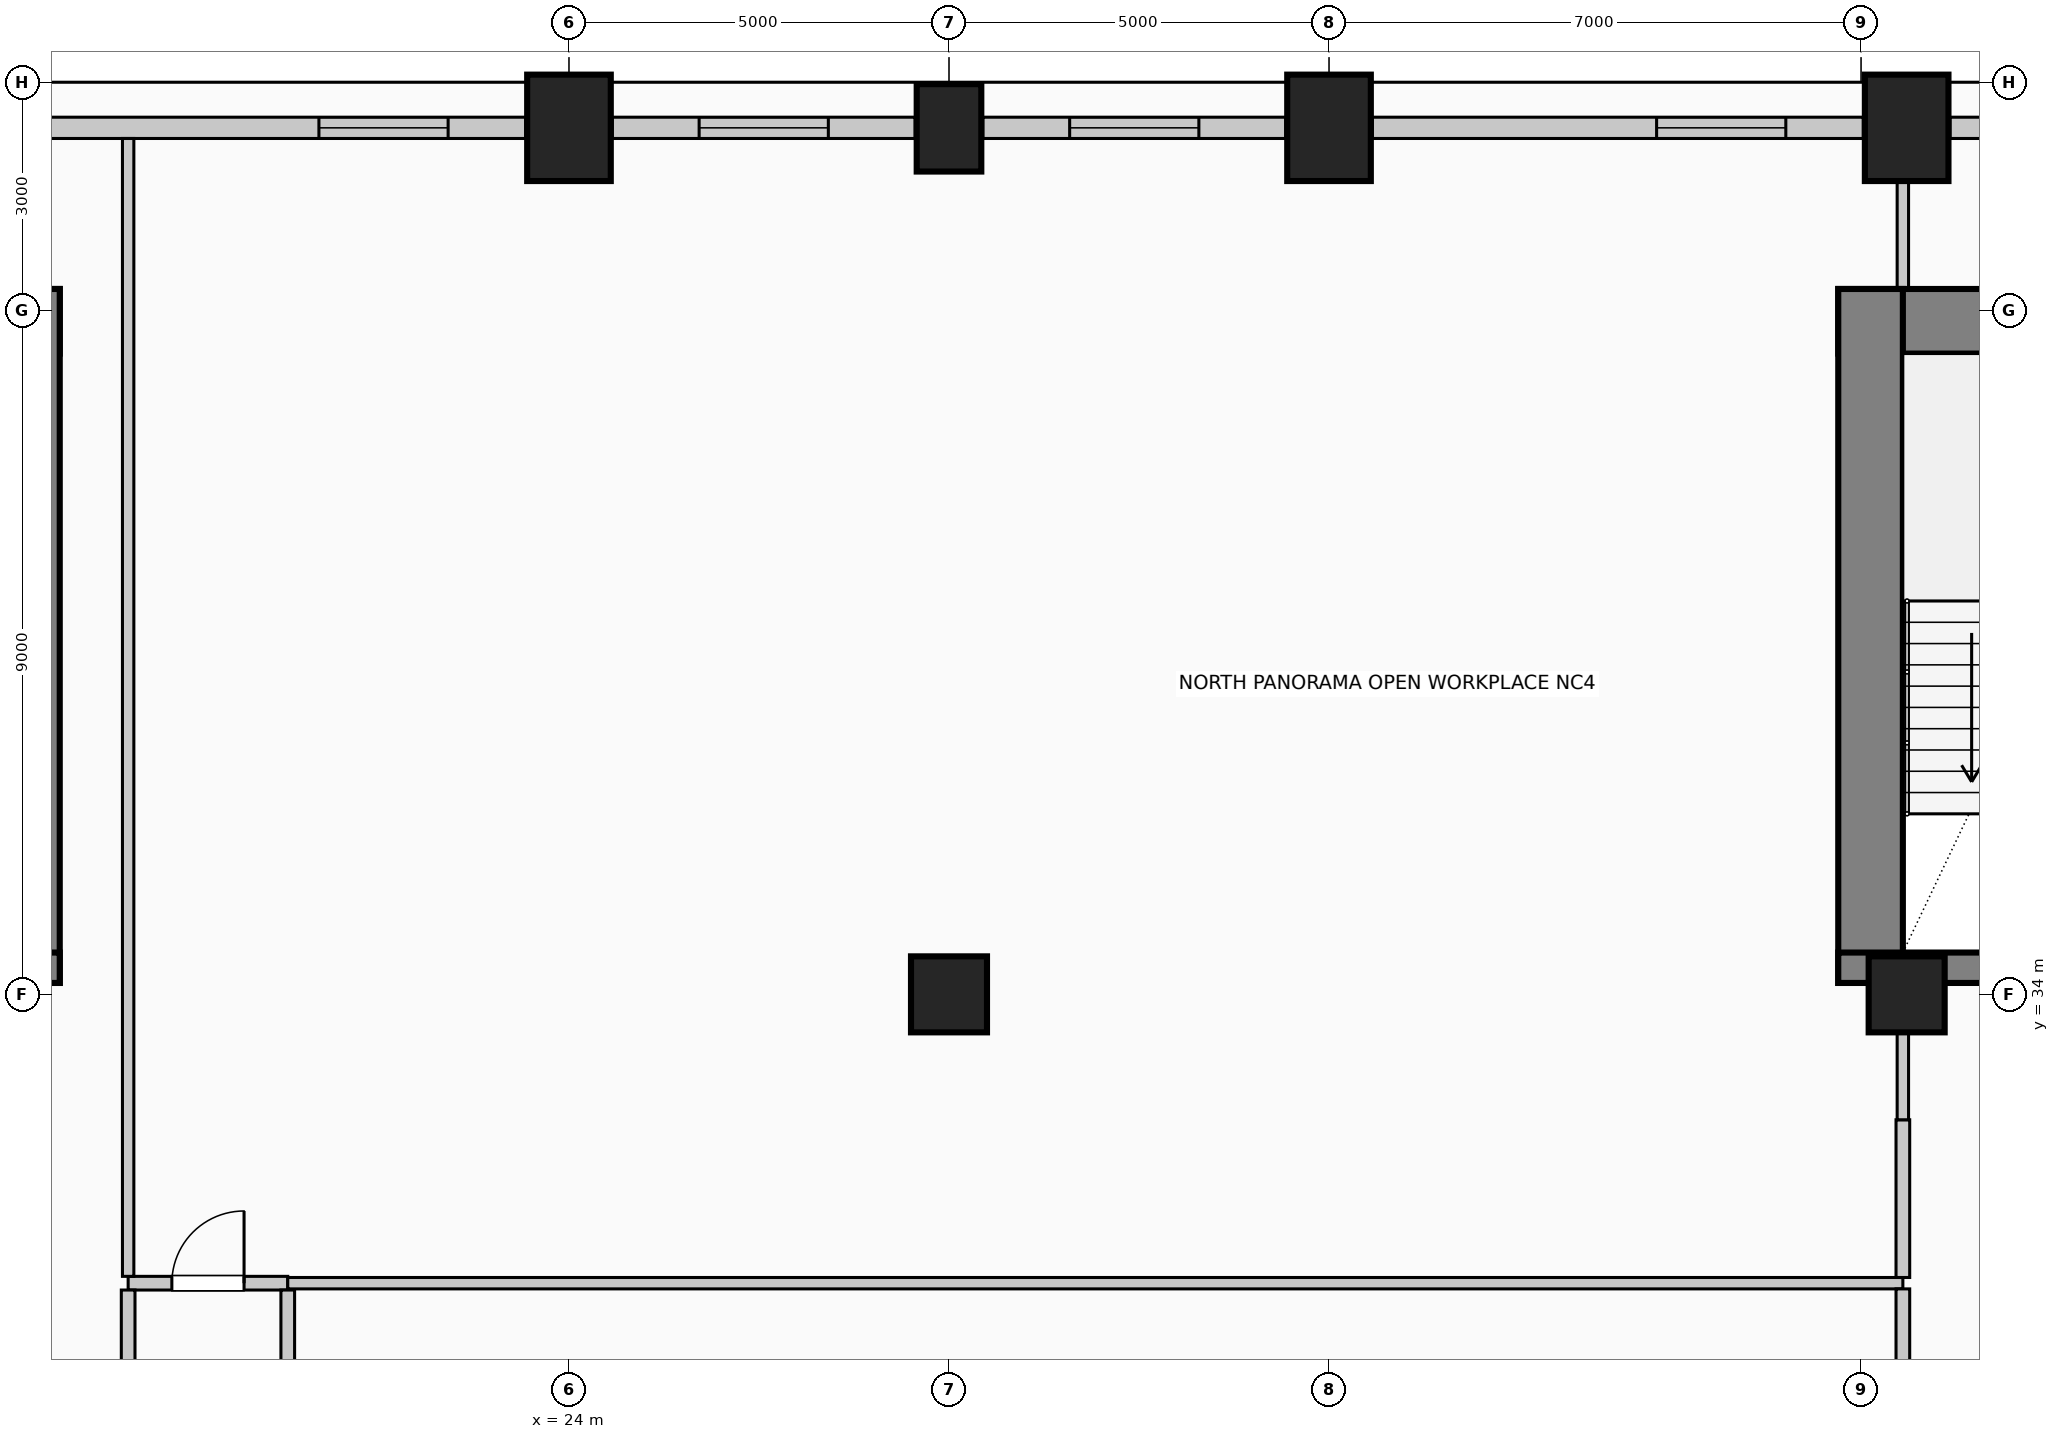
"""IFC4 building model, lengths in metres.
Left out: names, types, materials, properties, quantities, classifications, styles, units other than length and angle.
Written with IfcOpenShell. Run it as: python <this file> out.ifc"""

import sys

from ifc_helpers import new_model, si_unit, direction, frame, frame_2d, origin, origin_2d, place, context, subcontext, project, spatial, rectangle, circle, extrude, element, fill, save


model = new_model("IFC4")
c1 = context("Model", 3, precision=1e-05, world=origin(), true_north=direction((0.0, 1.0)))
c2 = subcontext(c1, "Body", "Model", "MODEL_VIEW")
j1 = project(units=[si_unit("LENGTHUNIT", "METRE"), si_unit("PLANEANGLEUNIT", "RADIAN")], contexts=[c1])
p1 = place(None, origin())
s1 = spatial("IfcSite", under=j1, at=p1, CompositionType="ELEMENT")
p2 = place(p1, origin())
s2 = spatial("IfcBuilding", under=s1, at=p2, CompositionType="ELEMENT")
p3 = place(p2, frame((0.0, 0.0, 104.6)))
s3 = spatial("IfcBuildingStorey", under=s2, at=p3, CompositionType="ELEMENT", Elevation=104.6)
p4 = place(p3, frame((2.7, 42.855, 0.0), z_axis=(0.0, 0.0, 1.0), x_axis=(1.0, 0.0, 0.0)))
e1 = element("IfcWall", 1, at=p4, inside=s3, PredefinedType="SHEAR", context=c2, shape_type="SweptSolid", body=[
    extrude(rectangle(XDim=14.6, YDim=0.85, at=frame_2d((7.3, 0.0))), origin(), (0.0, 0.0, 1.0), 4.0),
])
p5 = place(p3, frame((16.875, 34.15, 0.0), z_axis=(0.0, 0.0, 1.0), x_axis=(0.0, 1.0, 0.0)))
e2 = element("IfcWall", 2, at=p5, inside=s3, PredefinedType="SHEAR", context=c2, shape_type="SweptSolid", body=[
    extrude(rectangle(XDim=9.13, YDim=0.85, at=frame_2d((4.565, 0.0))), origin(), (0.0, 0.0, 1.0), 4.0),
])
p6 = place(p3, frame((12.29, 34.35, 0.0), z_axis=(0.0, 0.0, 1.0), x_axis=(1.0, 0.0, 0.0)))
e3 = element("IfcWall", 3, at=p6, inside=s3, PredefinedType="SHEAR", context=c2, shape_type="SweptSolid", body=[
    extrude(rectangle(XDim=5.01, YDim=0.4, at=frame_2d((2.505, 0.0))), origin(), (0.0, 0.0, 1.0), 4.0),
])
p7 = place(p6, frame((1.4, 0.0, 0.0)))
e4 = element("IfcOpeningElement", 4, at=p7, cuts=e3, PredefinedType="OPENING", context=c2, shape_type="SweptSolid", body=[
    extrude(rectangle(XDim=1.15, YDim=2.2, at=frame_2d((0.575, 1.1))), frame((0.0, 0.21, 0.0), z_axis=(0.0, -1.0, 0.0), x_axis=(1.0, 0.0, 0.0)), (0.0, 0.0, 1.0), 0.42),
])
p8 = place(p3, frame((40.7, 42.855, 0.0), z_axis=(0.0, 0.0, 1.0), x_axis=(1.0, 0.0, 0.0)))
e5 = element("IfcWall", 5, at=p8, inside=s3, PredefinedType="SHEAR", context=c2, shape_type="SweptSolid", body=[
    extrude(rectangle(XDim=14.6, YDim=0.85, at=frame_2d((7.3, 0.0))), origin(), (0.0, 0.0, 1.0), 4.0),
])
p9 = place(p3, frame((41.125, 34.15, 0.0), z_axis=(0.0, 0.0, 1.0), x_axis=(0.0, 1.0, 0.0)))
e6 = element("IfcWall", 6, at=p9, inside=s3, PredefinedType="SHEAR", context=c2, shape_type="SweptSolid", body=[
    extrude(rectangle(XDim=9.13, YDim=0.85, at=frame_2d((4.565, 0.0))), origin(), (0.0, 0.0, 1.0), 4.0),
])
p10 = place(p3, frame((40.7, 34.35, 0.0), z_axis=(0.0, 0.0, 1.0), x_axis=(1.0, 0.0, 0.0)))
e7 = element("IfcWall", 7, at=p10, inside=s3, PredefinedType="SHEAR", context=c2, shape_type="SweptSolid", body=[
    extrude(rectangle(XDim=5.01, YDim=0.4, at=frame_2d((2.505, 0.0))), origin(), (0.0, 0.0, 1.0), 4.0),
])
p11 = place(p10, frame((2.4, 0.0, 0.0)))
e8 = element("IfcOpeningElement", 8, at=p11, cuts=e7, PredefinedType="OPENING", context=c2, shape_type="SweptSolid", body=[
    extrude(rectangle(XDim=1.15, YDim=2.2, at=frame_2d((0.575, 1.1))), frame((0.0, 0.21, 0.0), z_axis=(0.0, -1.0, 0.0), x_axis=(1.0, 0.0, 0.0)), (0.0, 0.0, 1.0), 0.42),
])
p12 = place(p3, frame((24.0, 45.4, 0.0), z_axis=(0.0, 0.0, 1.0), x_axis=(1.0, 0.0, 0.0)))
e9 = element("IfcColumn", 9, at=p12, inside=s3, PredefinedType="COLUMN", context=c2, shape_type="SweptSolid", body=[
    extrude(rectangle(XDim=1.1, YDim=1.4, at=origin_2d()), origin(), (0.0, 0.0, 1.0), 4.0),
])
p13 = place(p3, frame((29.0, 45.4, 0.0), z_axis=(0.0, 0.0, 1.0), x_axis=(1.0, 0.0, 0.0)))
e10 = element("IfcColumn", 10, at=p13, inside=s3, PredefinedType="COLUMN", context=c2, shape_type="SweptSolid", body=[
    extrude(rectangle(XDim=0.85, YDim=1.15, at=origin_2d()), origin(), (0.0, 0.0, 1.0), 4.0),
])
for number, where, z_axis, x_axis in (
    (11, (34.0, 45.4, 0.0), (0.0, 0.0, 1.0), (1.0, 0.0, 0.0)),
    (12, (41.6, 45.4, 0.0), (0.0, 0.0, 1.0), (1.0, 0.0, 0.0)),
):
    element("IfcColumn", number, at=place(p3, frame(where, z_axis=z_axis, x_axis=x_axis)), inside=s3, PredefinedType="COLUMN", context=c2, shape_type="SweptSolid", body=[
        extrude(rectangle(XDim=1.1, YDim=1.4, at=origin_2d()), origin(), (0.0, 0.0, 1.0), 4.0),
    ])
for number, where, z_axis, x_axis in (
    (13, (29.0, 34.0, 0.0), (0.0, 0.0, 1.0), (1.0, 0.0, 0.0)),
    (14, (41.6, 34.0, 0.0), (0.0, 0.0, 1.0), (1.0, 0.0, 0.0)),
):
    element("IfcColumn", number, at=place(p3, frame(where, z_axis=z_axis, x_axis=x_axis)), inside=s3, PredefinedType="COLUMN", context=c2, shape_type="SweptSolid", body=[
        extrude(circle(Radius=0.5, at=origin_2d()), origin(), (0.0, 0.0, 1.0), 4.0),
    ])
p14 = place(p3, frame((16.97, 45.4, 0.0), z_axis=(0.0, 0.0, 1.0), x_axis=(1.0, 0.0, 0.0)))
e15 = element("IfcWall", 15, at=p14, inside=s3, PredefinedType="SOLIDWALL", context=c2, shape_type="SweptSolid", body=[
    extrude(rectangle(XDim=6.46, YDim=0.28, at=frame_2d((3.23, 0.0))), origin(), (0.0, 0.0, 1.0), 2.875),
])
p15 = place(p14, frame((3.74, 0.0, 0.5)))
e16 = element("IfcOpeningElement", 16, at=p15, cuts=e15, PredefinedType="OPENING", context=c2, shape_type="SweptSolid", body=[
    extrude(rectangle(XDim=1.7, YDim=1.95, at=frame_2d((0.85, 0.975))), frame((0.0, 0.15, 0.0), z_axis=(0.0, -1.0, 0.0), x_axis=(1.0, 0.0, 0.0)), (0.0, 0.0, 1.0), 0.3),
])
p16 = place(p3, frame((24.57, 45.4, 0.0), z_axis=(0.0, 0.0, 1.0), x_axis=(1.0, 0.0, 0.0)))
e17 = element("IfcWall", 17, at=p16, inside=s3, PredefinedType="SOLIDWALL", context=c2, shape_type="SweptSolid", body=[
    extrude(rectangle(XDim=3.985, YDim=0.28, at=frame_2d((1.992, 0.0))), origin(), (0.0, 0.0, 1.0), 2.875),
])
p17 = place(p16, frame((1.143, 0.0, 0.5)))
e18 = element("IfcOpeningElement", 18, at=p17, cuts=e17, PredefinedType="OPENING", context=c2, shape_type="SweptSolid", body=[
    extrude(rectangle(XDim=1.7, YDim=1.95, at=frame_2d((0.85, 0.975))), frame((0.0, 0.15, 0.0), z_axis=(0.0, -1.0, 0.0), x_axis=(1.0, 0.0, 0.0)), (0.0, 0.0, 1.0), 0.3),
])
p18 = place(p3, frame((29.445, 45.4, 0.0), z_axis=(0.0, 0.0, 1.0), x_axis=(1.0, 0.0, 0.0)))
e19 = element("IfcWall", 19, at=p18, inside=s3, PredefinedType="SOLIDWALL", context=c2, shape_type="SweptSolid", body=[
    extrude(rectangle(XDim=3.985, YDim=0.28, at=frame_2d((1.992, 0.0))), origin(), (0.0, 0.0, 1.0), 2.875),
])
p19 = place(p18, frame((1.143, 0.0, 0.5)))
e20 = element("IfcOpeningElement", 20, at=p19, cuts=e19, PredefinedType="OPENING", context=c2, shape_type="SweptSolid", body=[
    extrude(rectangle(XDim=1.7, YDim=1.95, at=frame_2d((0.85, 0.975))), frame((0.0, 0.15, 0.0), z_axis=(0.0, -1.0, 0.0), x_axis=(1.0, 0.0, 0.0)), (0.0, 0.0, 1.0), 0.3),
])
p20 = place(p3, frame((34.57, 45.4, 0.0), z_axis=(0.0, 0.0, 1.0), x_axis=(1.0, 0.0, 0.0)))
e21 = element("IfcWall", 21, at=p20, inside=s3, PredefinedType="SOLIDWALL", context=c2, shape_type="SweptSolid", body=[
    extrude(rectangle(XDim=6.46, YDim=0.28, at=frame_2d((3.23, 0.0))), origin(), (0.0, 0.0, 1.0), 2.875),
])
p21 = place(p20, frame((3.74, 0.0, 0.5)))
e22 = element("IfcOpeningElement", 22, at=p21, cuts=e21, PredefinedType="OPENING", context=c2, shape_type="SweptSolid", body=[
    extrude(rectangle(XDim=1.7, YDim=1.95, at=frame_2d((0.85, 0.975))), frame((0.0, 0.15, 0.0), z_axis=(0.0, -1.0, 0.0), x_axis=(1.0, 0.0, 0.0)), (0.0, 0.0, 1.0), 0.3),
])
p22 = place(p3, frame((42.17, 45.4, 0.0), z_axis=(0.0, 0.0, 1.0), x_axis=(1.0, 0.0, 0.0)))
e23 = element("IfcWall", 23, at=p22, inside=s3, PredefinedType="SOLIDWALL", context=c2, shape_type="SweptSolid", body=[
    extrude(rectangle(XDim=1.385, YDim=0.28, at=frame_2d((0.692, 0.0))), origin(), (0.0, 0.0, 1.0), 2.875),
])
p23 = place(p3, frame((18.2, 30.2, 0.0), z_axis=(0.0, 0.0, 1.0), x_axis=(1.0, 0.0, 0.0)))
e24 = element("IfcWall", 24, at=p23, inside=s3, PredefinedType="PARTITIONING", context=c2, shape_type="SweptSolid", body=[
    extrude(rectangle(XDim=2.1, YDim=0.18, at=frame_2d((1.05, 0.0))), origin(), (0.0, 0.0, 1.0), 3.725),
])
p24 = place(p23, frame((0.575, 0.0, 0.0)))
e25 = element("IfcOpeningElement", 25, at=p24, cuts=e24, PredefinedType="OPENING", context=c2, shape_type="SweptSolid", body=[
    extrude(rectangle(XDim=0.95, YDim=2.15, at=frame_2d((0.475, 1.075))), frame((0.0, 0.1, 0.0), z_axis=(0.0, -1.0, 0.0), x_axis=(1.0, 0.0, 0.0)), (0.0, 0.0, 1.0), 0.2),
])
p25 = place(p3, frame((20.3, 30.2, 0.0), z_axis=(0.0, 0.0, 1.0), x_axis=(1.0, 0.0, 0.0)))
e26 = element("IfcWall", 26, at=p25, inside=s3, PredefinedType="PARTITIONING", context=c2, shape_type="SweptSolid", body=[
    extrude(rectangle(XDim=21.25, YDim=0.15, at=frame_2d((10.625, 0.0))), origin(), (0.0, 0.0, 1.0), 3.725),
])
p26 = place(p3, frame((18.2, 15.74, 0.0), z_axis=(0.0, 0.0, 1.0), x_axis=(0.0, 1.0, 0.0)))
e27 = element("IfcWall", 27, at=p26, inside=s3, PredefinedType="PARTITIONING", context=c2, shape_type="SweptSolid", body=[
    extrude(rectangle(XDim=14.37, YDim=0.18, at=frame_2d((7.185, 0.0))), origin(), (0.0, 0.0, 1.0), 3.725),
])
p27 = place(p3, frame((18.2, 30.29, 0.0), z_axis=(0.0, 0.0, 1.0), x_axis=(0.0, 1.0, 0.0)))
e28 = element("IfcWall", 28, at=p27, inside=s3, PredefinedType="PARTITIONING", context=c2, shape_type="SweptSolid", body=[
    extrude(rectangle(XDim=14.97, YDim=0.15, at=frame_2d((7.485, 0.0))), origin(), (0.0, 0.0, 1.0), 3.725),
])
p28 = place(p3, frame((20.3, 15.74, 0.0), z_axis=(0.0, 0.0, 1.0), x_axis=(0.0, 1.0, 0.0)))
e29 = element("IfcWall", 29, at=p28, inside=s3, PredefinedType="PARTITIONING", context=c2, shape_type="SweptSolid", body=[
    extrude(rectangle(XDim=14.37, YDim=0.18, at=frame_2d((7.185, 0.0))), origin(), (0.0, 0.0, 1.0), 3.725),
])
p29 = place(p3, frame((41.55, 18.5, 0.0), z_axis=(0.0, 0.0, 1.0), x_axis=(0.0, 1.0, 0.0)))
e30 = element("IfcWall", 30, at=p29, inside=s3, PredefinedType="PARTITIONING", context=c2, shape_type="SweptSolid", body=[
    extrude(rectangle(XDim=11.625, YDim=0.18, at=frame_2d((5.812, 0.0))), origin(), (0.0, 0.0, 1.0), 3.07),
])
p30 = place(p3, frame((41.55, 30.275, 0.0), z_axis=(0.0, 0.0, 1.0), x_axis=(0.0, 1.0, 0.0)))
e31 = element("IfcWall", 31, at=p30, inside=s3, PredefinedType="PARTITIONING", context=c2, shape_type="SweptSolid", body=[
    extrude(rectangle(XDim=2.075, YDim=0.18, at=frame_2d((1.038, 0.0))), origin(), (0.0, 0.0, 1.0), 3.07),
])
p31 = place(p3, frame((41.55, 32.35, 0.0), z_axis=(0.0, 0.0, 1.0), x_axis=(0.0, 1.0, 0.0)))
e32 = element("IfcWall", 32, at=p31, inside=s3, PredefinedType="PARTITIONING", context=c2, shape_type="SweptSolid", body=[
    extrude(rectangle(XDim=1.15, YDim=0.15, at=frame_2d((0.575, 0.0))), origin(), (0.0, 0.0, 1.0), 3.07),
])
p32 = place(p3, frame((41.55, 43.28, 0.0), z_axis=(0.0, 0.0, 1.0), x_axis=(0.0, 1.0, 0.0)))
e33 = element("IfcWall", 33, at=p32, inside=s3, PredefinedType="PARTITIONING", context=c2, shape_type="SweptSolid", body=[
    extrude(rectangle(XDim=1.42, YDim=0.15, at=frame_2d((0.71, 0.0))), origin(), (0.0, 0.0, 1.0), 3.725),
])
p33 = place(p15, origin())
e34 = element("IfcWindow", 34, at=p33, inside=s3, PartitioningType="SINGLE_PANEL", PredefinedType="WINDOW", context=c2, shape_type="SweptSolid", body=[
    extrude(rectangle(XDim=1.7, YDim=1.95, at=frame_2d((0.85, 0.975))), frame((0.0, 0.03, 0.0), z_axis=(0.0, -1.0, 0.0), x_axis=(1.0, 0.0, 0.0)), (0.0, 0.0, 1.0), 0.06),
])
fill(e16, e34)
p34 = place(p17, origin())
e35 = element("IfcWindow", 35, at=p34, inside=s3, PartitioningType="SINGLE_PANEL", PredefinedType="WINDOW", context=c2, shape_type="SweptSolid", body=[
    extrude(rectangle(XDim=1.7, YDim=1.95, at=frame_2d((0.85, 0.975))), frame((0.0, 0.03, 0.0), z_axis=(0.0, -1.0, 0.0), x_axis=(1.0, 0.0, 0.0)), (0.0, 0.0, 1.0), 0.06),
])
fill(e18, e35)
p35 = place(p19, origin())
e36 = element("IfcWindow", 36, at=p35, inside=s3, PartitioningType="SINGLE_PANEL", PredefinedType="WINDOW", context=c2, shape_type="SweptSolid", body=[
    extrude(rectangle(XDim=1.7, YDim=1.95, at=frame_2d((0.85, 0.975))), frame((0.0, 0.03, 0.0), z_axis=(0.0, -1.0, 0.0), x_axis=(1.0, 0.0, 0.0)), (0.0, 0.0, 1.0), 0.06),
])
fill(e20, e36)
p36 = place(p21, origin())
e37 = element("IfcWindow", 37, at=p36, inside=s3, PartitioningType="SINGLE_PANEL", PredefinedType="WINDOW", context=c2, shape_type="SweptSolid", body=[
    extrude(rectangle(XDim=1.7, YDim=1.95, at=frame_2d((0.85, 0.975))), frame((0.0, 0.03, 0.0), z_axis=(0.0, -1.0, 0.0), x_axis=(1.0, 0.0, 0.0)), (0.0, 0.0, 1.0), 0.06),
])
fill(e22, e37)
p37 = place(p24, origin())
e38 = element("IfcDoor", 38, at=p37, inside=s3, OperationType="SINGLE_SWING_RIGHT", PredefinedType="DOOR", context=c2, shape_type="SweptSolid", body=[
    extrude(rectangle(XDim=0.95, YDim=2.15, at=frame_2d((0.475, 1.075))), frame((0.0, 0.025, 0.0), z_axis=(0.0, -1.0, 0.0), x_axis=(1.0, 0.0, 0.0)), (0.0, 0.0, 1.0), 0.05),
])
fill(e25, e38)
save(model, sys.argv[1])
